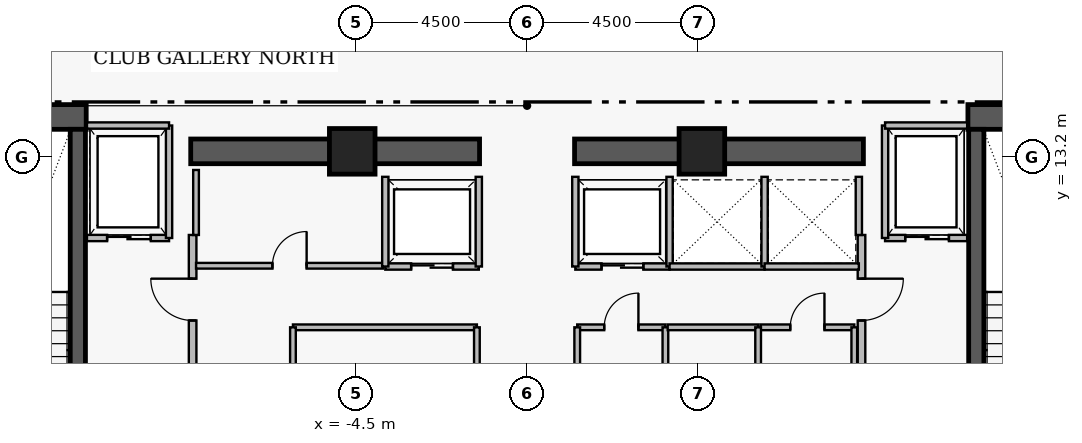
"""IFC4 building model, lengths in metres.
Left out: names, types, materials, properties, quantities, classifications, styles, units other than length and angle.
Written with IfcOpenShell. Run it as: python <this file> out.ifc"""

import sys

from ifc_helpers import new_model, si_unit, direction, frame, frame_2d, origin, origin_2d, place, context, subcontext, project, spatial, rectangle, extrude, element, fill, save


model = new_model("IFC4")
c1 = context("Model", 3, precision=1e-05, world=origin(), true_north=direction((0.0, 1.0)))
c2 = subcontext(c1, "Body", "Model", "MODEL_VIEW")
j1 = project(units=[si_unit("LENGTHUNIT", "METRE"), si_unit("PLANEANGLEUNIT", "RADIAN")], contexts=[c1])
p1 = place(None, origin())
s1 = spatial("IfcSite", under=j1, at=p1, CompositionType="ELEMENT")
p2 = place(p1, origin())
s2 = spatial("IfcBuilding", under=s1, at=p2, CompositionType="ELEMENT")
p3 = place(p2, frame((0.0, 0.0, 192.4)))
s3 = spatial("IfcBuildingStorey", under=s2, at=p3, CompositionType="ELEMENT", Elevation=192.4)
for number, where, z_axis, x_axis in (
    (1, (-16.06, 14.255, 0.0), (0.0, 0.0, 1.0), (1.0, 0.0, 0.0)),
    (2, (11.6, 14.255, 0.0), (0.0, 0.0, 1.0), (1.0, 0.0, 0.0)),
):
    element("IfcWall", number, at=place(p3, frame(where, z_axis=z_axis, x_axis=x_axis)), inside=s3, PredefinedType="SHEAR", context=c2, shape_type="SweptSolid", body=[
        extrude(rectangle(XDim=4.46, YDim=0.65, at=frame_2d((2.23, 0.0))), origin(), (0.0, 0.0, 1.0), 3.56),
    ])
for number, where, z_axis, x_axis in (
    (3, (-8.85, 13.35, 0.0), (0.0, 0.0, 1.0), (1.0, 0.0, 0.0)),
    (4, (1.25, 13.35, 0.0), (0.0, 0.0, 1.0), (1.0, 0.0, 0.0)),
):
    element("IfcWall", number, at=place(p3, frame(where, z_axis=z_axis, x_axis=x_axis)), inside=s3, PredefinedType="SHEAR", context=c2, shape_type="SweptSolid", body=[
        extrude(rectangle(XDim=7.6, YDim=0.65, at=frame_2d((3.8, 0.0))), origin(), (0.0, 0.0, 1.0), 3.53),
    ])
p4 = place(p3, frame((-11.82, 4.97, 0.0), z_axis=(0.0, 0.0, 1.0), x_axis=(0.0, 1.0, 0.0)))
e5 = element("IfcWall", 5, at=p4, inside=s3, PredefinedType="SHEAR", context=c2, shape_type="SweptSolid", body=[
    extrude(rectangle(XDim=8.96, YDim=0.4, at=frame_2d((4.48, 0.0))), origin(), (0.0, 0.0, 1.0), 3.56),
])
p5 = place(p4, frame((0.31, 0.0, 0.0)))
e6 = element("IfcOpeningElement", 6, at=p5, cuts=e5, PredefinedType="OPENING", context=c2, shape_type="SweptSolid", body=[
    extrude(rectangle(XDim=1.12, YDim=2.22, at=frame_2d((0.56, 1.11))), frame((0.0, 0.21, 0.0), z_axis=(0.0, -1.0, 0.0), x_axis=(1.0, 0.0, 0.0)), (0.0, 0.0, 1.0), 0.42),
])
p6 = place(p3, frame((11.82, 13.93, 0.0), z_axis=(0.0, 0.0, 1.0), x_axis=(0.0, -1.0, 0.0)))
e7 = element("IfcWall", 7, at=p6, inside=s3, PredefinedType="SHEAR", context=c2, shape_type="SweptSolid", body=[
    extrude(rectangle(XDim=8.96, YDim=0.4, at=frame_2d((4.48, 0.0))), origin(), (0.0, 0.0, 1.0), 3.56),
])
p7 = place(p6, frame((7.53, 0.0, 0.0)))
e8 = element("IfcOpeningElement", 8, at=p7, cuts=e7, PredefinedType="OPENING", context=c2, shape_type="SweptSolid", body=[
    extrude(rectangle(XDim=1.12, YDim=2.22, at=frame_2d((0.56, 1.11))), frame((0.0, 0.21, 0.0), z_axis=(0.0, -1.0, 0.0), x_axis=(1.0, 0.0, 0.0)), (0.0, 0.0, 1.0), 0.42),
])
for number, where, z_axis, x_axis in (
    (9, (-4.6, 13.35, 0.0), (0.0, 0.0, 1.0), (1.0, 0.0, 0.0)),
    (10, (4.6, 13.35, 0.0), (0.0, 0.0, 1.0), (1.0, 0.0, 0.0)),
):
    element("IfcColumn", number, at=place(p3, frame(where, z_axis=z_axis, x_axis=x_axis)), inside=s3, PredefinedType="COLUMN", context=c2, shape_type="SweptSolid", body=[
        extrude(rectangle(XDim=1.2, YDim=1.2, at=origin_2d()), origin(), (0.0, 0.0, 1.0), 3.75),
    ])
p8 = place(p3, frame((-8.8, 5.05, 0.0), z_axis=(0.0, 0.0, 1.0), x_axis=(0.0, 1.0, 0.0)))
e11 = element("IfcWall", 11, at=p8, inside=s3, PredefinedType="PARTITIONING", context=c2, shape_type="SweptSolid", body=[
    extrude(rectangle(XDim=6.1, YDim=0.2, at=frame_2d((3.05, 0.0))), origin(), (0.0, 0.0, 1.0), 3.53),
])
p9 = place(p8, frame((0.25, 0.0, 0.0)))
e12 = element("IfcOpeningElement", 12, at=p9, cuts=e11, PredefinedType="OPENING", context=c2, shape_type="SweptSolid", body=[
    extrude(rectangle(XDim=1.1, YDim=2.2, at=frame_2d((0.55, 1.1))), frame((0.0, 0.11, 0.0), z_axis=(0.0, -1.0, 0.0), x_axis=(1.0, 0.0, 0.0)), (0.0, 0.0, 1.0), 0.22),
])
p10 = place(p8, frame((3.85, 0.0, 0.0)))
e13 = element("IfcOpeningElement", 13, at=p10, cuts=e11, PredefinedType="OPENING", context=c2, shape_type="SweptSolid", body=[
    extrude(rectangle(XDim=1.1, YDim=2.2, at=frame_2d((0.55, 1.1))), frame((0.0, 0.11, 0.0), z_axis=(0.0, -1.0, 0.0), x_axis=(1.0, 0.0, 0.0)), (0.0, 0.0, 1.0), 0.22),
])
p11 = place(p3, frame((8.8, 11.15, 0.0), z_axis=(0.0, 0.0, 1.0), x_axis=(0.0, -1.0, 0.0)))
e14 = element("IfcWall", 14, at=p11, inside=s3, PredefinedType="PARTITIONING", context=c2, shape_type="SweptSolid", body=[
    extrude(rectangle(XDim=6.1, YDim=0.2, at=frame_2d((3.05, 0.0))), origin(), (0.0, 0.0, 1.0), 3.53),
])
p12 = place(p11, frame((1.15, 0.0, 0.0)))
e15 = element("IfcOpeningElement", 15, at=p12, cuts=e14, PredefinedType="OPENING", context=c2, shape_type="SweptSolid", body=[
    extrude(rectangle(XDim=1.1, YDim=2.2, at=frame_2d((0.55, 1.1))), frame((0.0, 0.11, 0.0), z_axis=(0.0, -1.0, 0.0), x_axis=(1.0, 0.0, 0.0)), (0.0, 0.0, 1.0), 0.22),
])
p13 = place(p11, frame((4.75, 0.0, 0.0)))
e16 = element("IfcOpeningElement", 16, at=p13, cuts=e14, PredefinedType="OPENING", context=c2, shape_type="SweptSolid", body=[
    extrude(rectangle(XDim=1.1, YDim=2.2, at=frame_2d((0.55, 1.1))), frame((0.0, 0.11, 0.0), z_axis=(0.0, -1.0, 0.0), x_axis=(1.0, 0.0, 0.0)), (0.0, 0.0, 1.0), 0.22),
])
p14 = place(p3, frame((-11.58, 11.07, 0.0), z_axis=(0.0, 0.0, 1.0), x_axis=(1.0, 0.0, 0.0)))
e17 = element("IfcWall", 17, at=p14, inside=s3, PredefinedType="PARTITIONING", context=c2, shape_type="SweptSolid", body=[
    extrude(rectangle(XDim=2.16, YDim=0.165, at=frame_2d((1.08, 0.0))), origin(), (0.0, 0.0, 1.0), 3.53),
])
p15 = place(p14, frame((0.53, 0.0, 0.0)))
e18 = element("IfcOpeningElement", 18, at=p15, cuts=e17, PredefinedType="OPENING", context=c2, shape_type="SweptSolid", body=[
    extrude(rectangle(XDim=1.15, YDim=2.25, at=frame_2d((0.575, 1.125))), frame((0.0, 0.093, 0.0), z_axis=(0.0, -1.0, 0.0), x_axis=(1.0, 0.0, 0.0)), (0.0, 0.0, 1.0), 0.185),
])
p16 = place(p3, frame((9.42, 11.07, 0.0), z_axis=(0.0, 0.0, 1.0), x_axis=(1.0, 0.0, 0.0)))
e19 = element("IfcWall", 19, at=p16, inside=s3, PredefinedType="PARTITIONING", context=c2, shape_type="SweptSolid", body=[
    extrude(rectangle(XDim=2.16, YDim=0.165, at=frame_2d((1.08, 0.0))), origin(), (0.0, 0.0, 1.0), 3.53),
])
p17 = place(p16, frame((0.53, 0.0, 0.0)))
e20 = element("IfcOpeningElement", 20, at=p17, cuts=e19, PredefinedType="OPENING", context=c2, shape_type="SweptSolid", body=[
    extrude(rectangle(XDim=1.15, YDim=2.25, at=frame_2d((0.575, 1.125))), frame((0.0, 0.093, 0.0), z_axis=(0.0, -1.0, 0.0), x_axis=(1.0, 0.0, 0.0)), (0.0, 0.0, 1.0), 0.185),
])
p18 = place(p3, frame((-3.73, 10.32, 0.0), z_axis=(0.0, 0.0, 1.0), x_axis=(1.0, 0.0, 0.0)))
e21 = element("IfcWall", 21, at=p18, inside=s3, PredefinedType="PARTITIONING", context=c2, shape_type="SweptSolid", body=[
    extrude(rectangle(XDim=2.46, YDim=0.165, at=frame_2d((1.23, 0.0))), origin(), (0.0, 0.0, 1.0), 3.53),
])
p19 = place(p18, frame((0.68, 0.0, 0.0)))
e22 = element("IfcOpeningElement", 22, at=p19, cuts=e21, PredefinedType="OPENING", context=c2, shape_type="SweptSolid", body=[
    extrude(rectangle(XDim=1.1, YDim=2.25, at=frame_2d((0.55, 1.125))), frame((0.0, 0.093, 0.0), z_axis=(0.0, -1.0, 0.0), x_axis=(1.0, 0.0, 0.0)), (0.0, 0.0, 1.0), 0.185),
])
p20 = place(p3, frame((1.27, 10.32, 0.0), z_axis=(0.0, 0.0, 1.0), x_axis=(1.0, 0.0, 0.0)))
e23 = element("IfcWall", 23, at=p20, inside=s3, PredefinedType="PARTITIONING", context=c2, shape_type="SweptSolid", body=[
    extrude(rectangle(XDim=2.48, YDim=0.165, at=frame_2d((1.24, 0.0))), origin(), (0.0, 0.0, 1.0), 3.53),
])
p21 = place(p20, frame((0.69, 0.0, 0.0)))
e24 = element("IfcOpeningElement", 24, at=p21, cuts=e23, PredefinedType="OPENING", context=c2, shape_type="SweptSolid", body=[
    extrude(rectangle(XDim=1.1, YDim=2.25, at=frame_2d((0.55, 1.125))), frame((0.0, 0.093, 0.0), z_axis=(0.0, -1.0, 0.0), x_axis=(1.0, 0.0, 0.0)), (0.0, 0.0, 1.0), 0.185),
])
p22 = place(p3, frame((-8.71, 10.34, 0.0), z_axis=(0.0, 0.0, 1.0), x_axis=(1.0, 0.0, 0.0)))
e25 = element("IfcWall", 25, at=p22, inside=s3, PredefinedType="PARTITIONING", context=c2, shape_type="SweptSolid", body=[
    extrude(rectangle(XDim=4.92, YDim=0.15, at=frame_2d((2.46, 0.0))), origin(), (0.0, 0.0, 1.0), 3.53),
])
p23 = place(p22, frame((2.01, 0.0, 0.0)))
e26 = element("IfcOpeningElement", 26, at=p23, cuts=e25, PredefinedType="OPENING", context=c2, shape_type="SweptSolid", body=[
    extrude(rectangle(XDim=0.9, YDim=2.15, at=frame_2d((0.45, 1.075))), frame((0.0, 0.085, 0.0), z_axis=(0.0, -1.0, 0.0), x_axis=(1.0, 0.0, 0.0)), (0.0, 0.0, 1.0), 0.17),
])
p24 = place(p3, frame((1.32, 8.72, 0.0), z_axis=(0.0, 0.0, 1.0), x_axis=(1.0, 0.0, 0.0)))
e27 = element("IfcWall", 27, at=p24, inside=s3, PredefinedType="PARTITIONING", context=c2, shape_type="SweptSolid", body=[
    extrude(rectangle(XDim=2.32, YDim=0.15, at=frame_2d((1.16, 0.0))), origin(), (0.0, 0.0, 1.0), 3.53),
])
p25 = place(p24, frame((0.71, 0.0, 0.0)))
e28 = element("IfcOpeningElement", 28, at=p25, cuts=e27, PredefinedType="OPENING", context=c2, shape_type="SweptSolid", body=[
    extrude(rectangle(XDim=0.9, YDim=2.15, at=frame_2d((0.45, 1.075))), frame((0.0, 0.085, 0.0), z_axis=(0.0, -1.0, 0.0), x_axis=(1.0, 0.0, 0.0)), (0.0, 0.0, 1.0), 0.17),
])
p26 = place(p3, frame((6.14, 8.72, 0.0), z_axis=(0.0, 0.0, 1.0), x_axis=(1.0, 0.0, 0.0)))
e29 = element("IfcWall", 29, at=p26, inside=s3, PredefinedType="PARTITIONING", context=c2, shape_type="SweptSolid", body=[
    extrude(rectangle(XDim=2.47, YDim=0.15, at=frame_2d((1.235, 0.0))), origin(), (0.0, 0.0, 1.0), 3.53),
])
p27 = place(p26, frame((0.785, 0.0, 0.0)))
e30 = element("IfcOpeningElement", 30, at=p27, cuts=e29, PredefinedType="OPENING", context=c2, shape_type="SweptSolid", body=[
    extrude(rectangle(XDim=0.9, YDim=2.15, at=frame_2d((0.45, 1.075))), frame((0.0, 0.085, 0.0), z_axis=(0.0, -1.0, 0.0), x_axis=(1.0, 0.0, 0.0)), (0.0, 0.0, 1.0), 0.17),
])
p28 = place(p3, frame((-9.42, 11.07, 0.0), z_axis=(0.0, 0.0, 1.0), x_axis=(0.0, 1.0, 0.0)))
e31 = element("IfcWall", 31, at=p28, inside=s3, PredefinedType="PARTITIONING", context=c2, shape_type="SweptSolid", body=[
    extrude(rectangle(XDim=2.96, YDim=0.165, at=frame_2d((1.48, 0.0))), origin(), (0.0, 0.0, 1.0), 3.53),
])
p29 = place(p3, frame((-11.58, 14.03, 0.0), z_axis=(0.0, 0.0, 1.0), x_axis=(1.0, 0.0, 0.0)))
e32 = element("IfcWall", 32, at=p29, inside=s3, PredefinedType="PARTITIONING", context=c2, shape_type="SweptSolid", body=[
    extrude(rectangle(XDim=2.16, YDim=0.165, at=frame_2d((1.08, 0.0))), origin(), (0.0, 0.0, 1.0), 3.53),
])
p30 = place(p3, frame((9.42, 11.07, 0.0), z_axis=(0.0, 0.0, 1.0), x_axis=(0.0, 1.0, 0.0)))
e33 = element("IfcWall", 33, at=p30, inside=s3, PredefinedType="PARTITIONING", context=c2, shape_type="SweptSolid", body=[
    extrude(rectangle(XDim=2.96, YDim=0.165, at=frame_2d((1.48, 0.0))), origin(), (0.0, 0.0, 1.0), 3.53),
])
p31 = place(p3, frame((9.42, 14.03, 0.0), z_axis=(0.0, 0.0, 1.0), x_axis=(1.0, 0.0, 0.0)))
e34 = element("IfcWall", 34, at=p31, inside=s3, PredefinedType="PARTITIONING", context=c2, shape_type="SweptSolid", body=[
    extrude(rectangle(XDim=2.16, YDim=0.165, at=frame_2d((1.08, 0.0))), origin(), (0.0, 0.0, 1.0), 3.53),
])
for number, where, z_axis, x_axis in (
    (35, (-3.73, 10.32, 0.0), (0.0, 0.0, 1.0), (0.0, 1.0, 0.0)),
    (36, (-1.27, 10.32, 0.0), (0.0, 0.0, 1.0), (0.0, 1.0, 0.0)),
    (37, (1.27, 10.32, 0.0), (0.0, 0.0, 1.0), (0.0, 1.0, 0.0)),
    (38, (3.75, 10.32, 0.0), (0.0, 0.0, 1.0), (0.0, 1.0, 0.0)),
):
    element("IfcWall", number, at=place(p3, frame(where, z_axis=z_axis, x_axis=x_axis)), inside=s3, PredefinedType="PARTITIONING", context=c2, shape_type="SweptSolid", body=[
        extrude(rectangle(XDim=2.36, YDim=0.165, at=frame_2d((1.18, 0.0))), origin(), (0.0, 0.0, 1.0), 3.53),
    ])
p32 = place(p3, frame((3.75, 10.32, 0.0), z_axis=(0.0, 0.0, 1.0), x_axis=(1.0, 0.0, 0.0)))
e39 = element("IfcWall", 39, at=p32, inside=s3, PredefinedType="PARTITIONING", context=c2, shape_type="SweptSolid", body=[
    extrude(rectangle(XDim=2.5, YDim=0.165, at=frame_2d((1.25, 0.0))), origin(), (0.0, 0.0, 1.0), 3.53),
])
p33 = place(p3, frame((6.25, 10.32, 0.0), z_axis=(0.0, 0.0, 1.0), x_axis=(0.0, 1.0, 0.0)))
e40 = element("IfcWall", 40, at=p33, inside=s3, PredefinedType="PARTITIONING", context=c2, shape_type="SweptSolid", body=[
    extrude(rectangle(XDim=2.36, YDim=0.165, at=frame_2d((1.18, 0.0))), origin(), (0.0, 0.0, 1.0), 3.53),
])
p34 = place(p3, frame((6.25, 10.32, 0.0), z_axis=(0.0, 0.0, 1.0), x_axis=(1.0, 0.0, 0.0)))
e41 = element("IfcWall", 41, at=p34, inside=s3, PredefinedType="PARTITIONING", context=c2, shape_type="SweptSolid", body=[
    extrude(rectangle(XDim=2.48, YDim=0.165, at=frame_2d((1.24, 0.0))), origin(), (0.0, 0.0, 1.0), 3.53),
])
p35 = place(p3, frame((8.73, 11.15, 0.0), z_axis=(0.0, 0.0, 1.0), x_axis=(0.0, 1.0, 0.0)))
e42 = element("IfcWall", 42, at=p35, inside=s3, PredefinedType="PARTITIONING", context=c2, shape_type="SweptSolid", body=[
    extrude(rectangle(XDim=1.53, YDim=0.165, at=frame_2d((0.765, 0.0))), origin(), (0.0, 0.0, 1.0), 3.53),
])
p36 = place(p3, frame((-8.71, 11.15, 0.0), z_axis=(0.0, 0.0, 1.0), x_axis=(0.0, 1.0, 0.0)))
e43 = element("IfcWall", 43, at=p36, inside=s3, PredefinedType="PARTITIONING", context=c2, shape_type="SweptSolid", body=[
    extrude(rectangle(XDim=1.71, YDim=0.15, at=frame_2d((0.855, 0.0))), origin(), (0.0, 0.0, 1.0), 3.53),
])
p37 = place(p3, frame((-6.16, 8.72, 0.0), z_axis=(0.0, 0.0, 1.0), x_axis=(1.0, 0.0, 0.0)))
e44 = element("IfcWall", 44, at=p37, inside=s3, PredefinedType="PARTITIONING", context=c2, shape_type="SweptSolid", body=[
    extrude(rectangle(XDim=4.84, YDim=0.15, at=frame_2d((2.42, 0.0))), origin(), (0.0, 0.0, 1.0), 3.53),
])
for number, where, z_axis, x_axis in (
    (45, (-6.16, 6.48, 0.0), (0.0, 0.0, 1.0), (0.0, 1.0, 0.0)),
    (46, (-1.32, 6.48, 0.0), (0.0, 0.0, 1.0), (0.0, 1.0, 0.0)),
    (47, (1.32, 6.48, 0.0), (0.0, 0.0, 1.0), (0.0, 1.0, 0.0)),
    (48, (3.64, 6.48, 0.0), (0.0, 0.0, 1.0), (0.0, 1.0, 0.0)),
):
    element("IfcWall", number, at=place(p3, frame(where, z_axis=z_axis, x_axis=x_axis)), inside=s3, PredefinedType="PARTITIONING", context=c2, shape_type="SweptSolid", body=[
        extrude(rectangle(XDim=2.24, YDim=0.15, at=frame_2d((1.12, 0.0))), origin(), (0.0, 0.0, 1.0), 3.53),
    ])
p38 = place(p3, frame((3.7, 8.72, 0.0), z_axis=(0.0, 0.0, 1.0), x_axis=(1.0, 0.0, 0.0)))
e49 = element("IfcWall", 49, at=p38, inside=s3, PredefinedType="PARTITIONING", context=c2, shape_type="SweptSolid", body=[
    extrude(rectangle(XDim=2.38, YDim=0.15, at=frame_2d((1.19, 0.0))), origin(), (0.0, 0.0, 1.0), 3.53),
])
for number, where, z_axis, x_axis in (
    (50, (6.08, 6.48, 0.0), (0.0, 0.0, 1.0), (0.0, 1.0, 0.0)),
    (51, (8.61, 6.48, 0.0), (0.0, 0.0, 1.0), (0.0, 1.0, 0.0)),
):
    element("IfcWall", number, at=place(p3, frame(where, z_axis=z_axis, x_axis=x_axis)), inside=s3, PredefinedType="PARTITIONING", context=c2, shape_type="SweptSolid", body=[
        extrude(rectangle(XDim=2.24, YDim=0.15, at=frame_2d((1.12, 0.0))), origin(), (0.0, 0.0, 1.0), 3.53),
    ])
p39 = place(p10, origin())
e52 = element("IfcDoor", 52, at=p39, inside=s3, OperationType="SINGLE_SWING_RIGHT", PredefinedType="DOOR", context=c2, shape_type="SweptSolid", body=[
    extrude(rectangle(XDim=1.1, YDim=2.2, at=frame_2d((0.55, 1.1))), frame((0.0, 0.025, 0.0), z_axis=(0.0, -1.0, 0.0), x_axis=(1.0, 0.0, 0.0)), (0.0, 0.0, 1.0), 0.05),
])
fill(e13, e52)
p40 = place(p12, origin())
e53 = element("IfcDoor", 53, at=p40, inside=s3, OperationType="SINGLE_SWING_LEFT", PredefinedType="DOOR", context=c2, shape_type="SweptSolid", body=[
    extrude(rectangle(XDim=1.1, YDim=2.2, at=frame_2d((0.55, 1.1))), frame((0.0, 0.025, 0.0), z_axis=(0.0, -1.0, 0.0), x_axis=(1.0, 0.0, 0.0)), (0.0, 0.0, 1.0), 0.05),
])
fill(e15, e53)
p41 = place(p15, origin())
e54 = element("IfcDoor", 54, at=p41, inside=s3, OperationType="SLIDING_TO_LEFT", PredefinedType="DOOR", context=c2, shape_type="SweptSolid", body=[
    extrude(rectangle(XDim=1.15, YDim=2.25, at=frame_2d((0.575, 1.125))), frame((0.0, 0.025, 0.0), z_axis=(0.0, -1.0, 0.0), x_axis=(1.0, 0.0, 0.0)), (0.0, 0.0, 1.0), 0.05),
])
fill(e18, e54)
p42 = place(p17, origin())
e55 = element("IfcDoor", 55, at=p42, inside=s3, OperationType="SLIDING_TO_LEFT", PredefinedType="DOOR", context=c2, shape_type="SweptSolid", body=[
    extrude(rectangle(XDim=1.15, YDim=2.25, at=frame_2d((0.575, 1.125))), frame((0.0, 0.025, 0.0), z_axis=(0.0, -1.0, 0.0), x_axis=(1.0, 0.0, 0.0)), (0.0, 0.0, 1.0), 0.05),
])
fill(e20, e55)
p43 = place(p19, origin())
e56 = element("IfcDoor", 56, at=p43, inside=s3, OperationType="SLIDING_TO_LEFT", PredefinedType="DOOR", context=c2, shape_type="SweptSolid", body=[
    extrude(rectangle(XDim=1.1, YDim=2.25, at=frame_2d((0.55, 1.125))), frame((0.0, 0.025, 0.0), z_axis=(0.0, -1.0, 0.0), x_axis=(1.0, 0.0, 0.0)), (0.0, 0.0, 1.0), 0.05),
])
fill(e22, e56)
p44 = place(p21, origin())
e57 = element("IfcDoor", 57, at=p44, inside=s3, OperationType="SLIDING_TO_LEFT", PredefinedType="DOOR", context=c2, shape_type="SweptSolid", body=[
    extrude(rectangle(XDim=1.1, YDim=2.25, at=frame_2d((0.55, 1.125))), frame((0.0, 0.025, 0.0), z_axis=(0.0, -1.0, 0.0), x_axis=(1.0, 0.0, 0.0)), (0.0, 0.0, 1.0), 0.05),
])
fill(e24, e57)
p45 = place(p23, origin())
e58 = element("IfcDoor", 58, at=p45, inside=s3, OperationType="SINGLE_SWING_RIGHT", PredefinedType="DOOR", context=c2, shape_type="SweptSolid", body=[
    extrude(rectangle(XDim=0.9, YDim=2.15, at=frame_2d((0.45, 1.075))), frame((0.0, 0.025, 0.0), z_axis=(0.0, -1.0, 0.0), x_axis=(1.0, 0.0, 0.0)), (0.0, 0.0, 1.0), 0.05),
])
fill(e26, e58)
p46 = place(p25, origin())
e59 = element("IfcDoor", 59, at=p46, inside=s3, OperationType="SINGLE_SWING_RIGHT", PredefinedType="DOOR", context=c2, shape_type="SweptSolid", body=[
    extrude(rectangle(XDim=0.9, YDim=2.15, at=frame_2d((0.45, 1.075))), frame((0.0, 0.025, 0.0), z_axis=(0.0, -1.0, 0.0), x_axis=(1.0, 0.0, 0.0)), (0.0, 0.0, 1.0), 0.05),
])
fill(e28, e59)
p47 = place(p27, origin())
e60 = element("IfcDoor", 60, at=p47, inside=s3, OperationType="SINGLE_SWING_RIGHT", PredefinedType="DOOR", context=c2, shape_type="SweptSolid", body=[
    extrude(rectangle(XDim=0.9, YDim=2.15, at=frame_2d((0.45, 1.075))), frame((0.0, 0.025, 0.0), z_axis=(0.0, -1.0, 0.0), x_axis=(1.0, 0.0, 0.0)), (0.0, 0.0, 1.0), 0.05),
])
fill(e30, e60)
save(model, sys.argv[1])
